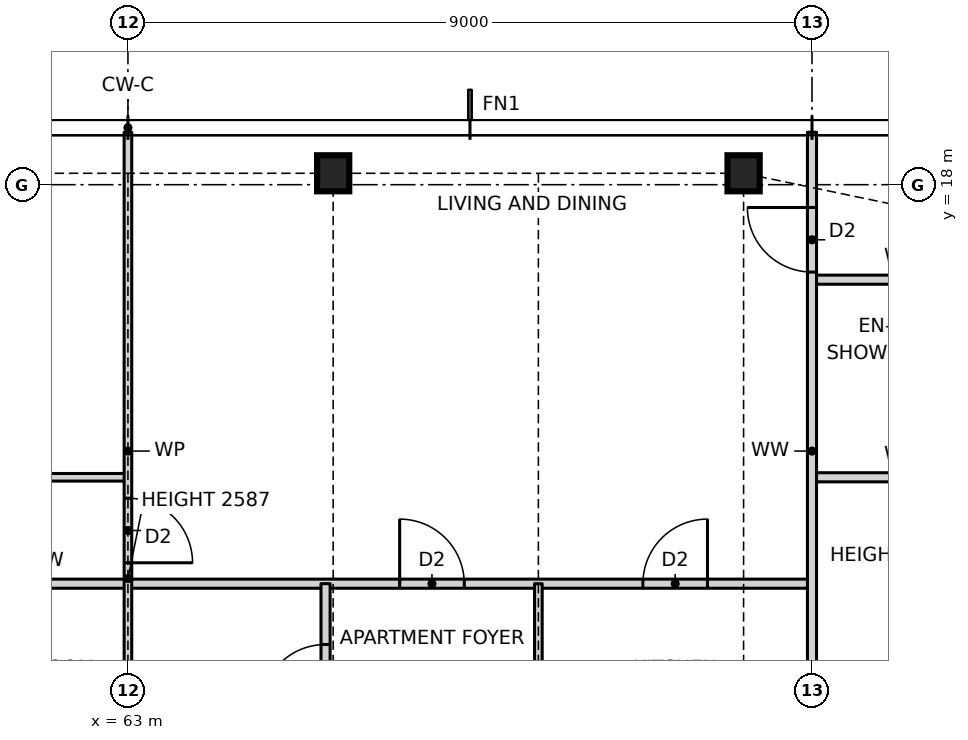
"""IFC4 building model, lengths in metres.
Left out: names, types, materials, properties, quantities, classifications, styles, units other than length and angle.
Written with IfcOpenShell. Run it as: python <this file> out.ifc"""

import sys

from ifc_helpers import new_model, si_unit, direction, frame, frame_2d, origin, origin_2d, place, context, subcontext, project, spatial, rectangle, i_section, extrude, element, fill, save


model = new_model("IFC4")
c1 = context("Model", 3, precision=1e-05, world=origin(), true_north=direction((0.0, 1.0)))
c2 = subcontext(c1, "Body", "Model", "MODEL_VIEW")
j1 = project(units=[si_unit("LENGTHUNIT", "METRE"), si_unit("PLANEANGLEUNIT", "RADIAN")], contexts=[c1])
p1 = place(None, origin())
s1 = spatial("IfcSite", under=j1, at=p1, CompositionType="ELEMENT")
p2 = place(p1, origin())
s2 = spatial("IfcBuilding", under=s1, at=p2, CompositionType="ELEMENT")
p3 = place(p2, frame((0.0, 0.0, 64.0)))
s3 = spatial("IfcBuildingStorey", under=s2, at=p3, CompositionType="ELEMENT", Elevation=64.0)
for number, where, z_axis, x_axis in (
    (1, (71.1, 18.15, 0.0), (0.0, 0.0, 1.0), (1.0, 0.0, 0.0)),
    (2, (65.7, 18.15, 0.0), (0.0, 0.0, 1.0), (1.0, 0.0, 0.0)),
):
    element("IfcColumn", number, at=place(p3, frame(where, z_axis=z_axis, x_axis=x_axis)), inside=s3, PredefinedType="COLUMN", context=c2, shape_type="SweptSolid", body=[
        extrude(i_section(OverallWidth=0.424, OverallDepth=0.475, WebThickness=0.048, FlangeThickness=0.077, at=origin_2d()), origin(), (0.0, 0.0, 1.0), 3.5),
    ])
p4 = place(p3, frame((51.8, 12.75, 0.0), z_axis=(0.0, 0.0, 1.0), x_axis=(1.0, 0.0, 0.0)))
e3 = element("IfcWall", 3, at=p4, inside=s3, PredefinedType="PARTITIONING", context=c2, shape_type="SweptSolid", body=[
    extrude(rectangle(XDim=20.2, YDim=0.12, at=frame_2d((10.1, 0.0))), origin(), (0.0, 0.0, 1.0), 3.27),
])
p5 = place(p4, frame((17.975, 0.0, 0.0)))
e4 = element("IfcOpeningElement", 4, at=p5, cuts=e3, PredefinedType="OPENING", context=c2, shape_type="SweptSolid", body=[
    extrude(rectangle(XDim=0.85, YDim=2.1, at=frame_2d((0.425, 1.05))), frame((0.0, 0.07, 0.0), z_axis=(0.0, -1.0, 0.0), x_axis=(1.0, 0.0, 0.0)), (0.0, 0.0, 1.0), 0.14),
])
p6 = place(p4, frame((14.775, 0.0, 0.0)))
e5 = element("IfcOpeningElement", 5, at=p6, cuts=e3, PredefinedType="OPENING", context=c2, shape_type="SweptSolid", body=[
    extrude(rectangle(XDim=0.85, YDim=2.1, at=frame_2d((0.425, 1.05))), frame((0.0, 0.07, 0.0), z_axis=(0.0, -1.0, 0.0), x_axis=(1.0, 0.0, 0.0)), (0.0, 0.0, 1.0), 0.14),
])
p7 = place(p4, frame((9.125, 0.0, 0.0)))
e6 = element("IfcOpeningElement", 6, at=p7, cuts=e3, PredefinedType="OPENING", context=c2, shape_type="SweptSolid", body=[
    extrude(rectangle(XDim=0.85, YDim=2.1, at=frame_2d((0.425, 1.05))), frame((0.0, 0.07, 0.0), z_axis=(0.0, -1.0, 0.0), x_axis=(1.0, 0.0, 0.0)), (0.0, 0.0, 1.0), 0.14),
])
p8 = place(p4, frame((3.525, 0.0, 0.0)))
e7 = element("IfcOpeningElement", 7, at=p8, cuts=e3, PredefinedType="OPENING", context=c2, shape_type="SweptSolid", body=[
    extrude(rectangle(XDim=0.85, YDim=2.1, at=frame_2d((0.425, 1.05))), frame((0.0, 0.07, 0.0), z_axis=(0.0, -1.0, 0.0), x_axis=(1.0, 0.0, 0.0)), (0.0, 0.0, 1.0), 0.14),
])
p9 = place(p3, frame((51.8, 14.15, 0.0), z_axis=(0.0, 0.0, 1.0), x_axis=(1.0, 0.0, 0.0)))
e8 = element("IfcWall", 8, at=p9, inside=s3, PredefinedType="PARTITIONING", context=c2, shape_type="SweptSolid", body=[
    extrude(rectangle(XDim=11.2, YDim=0.1, at=frame_2d((5.6, 0.0))), origin(), (0.0, 0.0, 1.0), 3.27),
])
p10 = place(p9, frame((8.525, 0.0, 0.0)))
e9 = element("IfcOpeningElement", 9, at=p10, cuts=e8, PredefinedType="OPENING", context=c2, shape_type="SweptSolid", body=[
    extrude(rectangle(XDim=0.85, YDim=2.1, at=frame_2d((0.425, 1.05))), frame((0.0, 0.06, 0.0), z_axis=(0.0, -1.0, 0.0), x_axis=(1.0, 0.0, 0.0)), (0.0, 0.0, 1.0), 0.12),
])
p11 = place(p9, frame((4.025, 0.0, 0.0)))
e10 = element("IfcOpeningElement", 10, at=p11, cuts=e8, PredefinedType="OPENING", context=c2, shape_type="SweptSolid", body=[
    extrude(rectangle(XDim=0.85, YDim=2.1, at=frame_2d((0.425, 1.05))), frame((0.0, 0.06, 0.0), z_axis=(0.0, -1.0, 0.0), x_axis=(1.0, 0.0, 0.0)), (0.0, 0.0, 1.0), 0.12),
])
p12 = place(p9, frame((0.675, 0.0, 0.0)))
e11 = element("IfcOpeningElement", 11, at=p12, cuts=e8, PredefinedType="OPENING", context=c2, shape_type="SweptSolid", body=[
    extrude(rectangle(XDim=0.85, YDim=2.1, at=frame_2d((0.425, 1.05))), frame((0.0, 0.06, 0.0), z_axis=(0.0, -1.0, 0.0), x_axis=(1.0, 0.0, 0.0)), (0.0, 0.0, 1.0), 0.12),
])
for number, where, z_axis, x_axis in (
    (12, (72.0, 14.15, 0.0), (0.0, 0.0, 1.0), (1.0, 0.0, 0.0)),
    (13, (72.0, 16.75, 0.0), (0.0, 0.0, 1.0), (1.0, 0.0, 0.0)),
):
    element("IfcWall", number, at=place(p3, frame(where, z_axis=z_axis, x_axis=x_axis)), inside=s3, PredefinedType="PARTITIONING", context=c2, shape_type="SweptSolid", body=[
        extrude(rectangle(XDim=2.4, YDim=0.12, at=frame_2d((1.2, 0.0))), origin(), (0.0, 0.0, 1.0), 3.27),
    ])
p13 = place(p3, frame((72.064, 10.3, 0.0), z_axis=(0.0, 0.0, 1.0), x_axis=(0.660700699661, 0.750649442461, 0.0)))
e14 = element("IfcWall", 14, at=p13, inside=s3, PredefinedType="PARTITIONING", context=c2, shape_type="SweptSolid", body=[
    extrude(rectangle(XDim=9.071, YDim=0.1, at=frame_2d((4.535, 0.0))), origin(), (0.0, 0.0, 1.0), 2.429),
])
p14 = place(p3, frame((72.0, 10.3, 0.0), z_axis=(0.0, 0.0, 1.0), x_axis=(0.0, 1.0, 0.0)))
e15 = element("IfcWall", 15, at=p14, inside=s3, PredefinedType="PARTITIONING", context=c2, shape_type="SweptSolid", body=[
    extrude(rectangle(XDim=8.39, YDim=0.12, at=frame_2d((4.195, 0.0))), origin(), (0.0, 0.0, 1.0), 3.27),
])
p15 = place(p14, frame((6.55, 0.0, 0.0)))
e16 = element("IfcOpeningElement", 16, at=p15, cuts=e15, PredefinedType="OPENING", context=c2, shape_type="SweptSolid", body=[
    extrude(rectangle(XDim=0.85, YDim=2.1, at=frame_2d((0.425, 1.05))), frame((0.0, 0.07, 0.0), z_axis=(0.0, -1.0, 0.0), x_axis=(1.0, 0.0, 0.0)), (0.0, 0.0, 1.0), 0.14),
])
p16 = place(p3, frame((68.4, 10.3, 0.0), z_axis=(0.0, 0.0, 1.0), x_axis=(0.0, 1.0, 0.0)))
e17 = element("IfcWall", 17, at=p16, inside=s3, PredefinedType="PARTITIONING", context=c2, shape_type="SweptSolid", body=[
    extrude(rectangle(XDim=2.45, YDim=0.1, at=frame_2d((1.225, 0.0))), origin(), (0.0, 0.0, 1.0), 2.587),
])
p17 = place(p3, frame((65.6, 10.3, 0.0), z_axis=(0.0, 0.0, 1.0), x_axis=(0.0, 1.0, 0.0)))
e18 = element("IfcWall", 18, at=p17, inside=s3, PredefinedType="PARTITIONING", context=c2, shape_type="SweptSolid", body=[
    extrude(rectangle(XDim=2.45, YDim=0.12, at=frame_2d((1.225, 0.0))), origin(), (0.0, 0.0, 1.0), 2.508),
])
p18 = place(p17, frame((0.8, 0.0, 0.0)))
e19 = element("IfcOpeningElement", 19, at=p18, cuts=e18, PredefinedType="OPENING", context=c2, shape_type="SweptSolid", body=[
    extrude(rectangle(XDim=0.85, YDim=2.1, at=frame_2d((0.425, 1.05))), frame((0.0, 0.07, 0.0), z_axis=(0.0, -1.0, 0.0), x_axis=(1.0, 0.0, 0.0)), (0.0, 0.0, 1.0), 0.14),
])
p19 = place(p3, frame((63.0, 10.3, 0.0), z_axis=(0.0, 0.0, 1.0), x_axis=(0.0, 1.0, 0.0)))
e20 = element("IfcWall", 20, at=p19, inside=s3, PredefinedType="PARTITIONING", context=c2, shape_type="SweptSolid", body=[
    extrude(rectangle(XDim=8.39, YDim=0.1, at=frame_2d((4.195, 0.0))), origin(), (0.0, 0.0, 1.0), 2.587),
])
p20 = place(p19, frame((2.725, 0.0, 0.0)))
e21 = element("IfcOpeningElement", 21, at=p20, cuts=e20, PredefinedType="OPENING", context=c2, shape_type="SweptSolid", body=[
    extrude(rectangle(XDim=0.85, YDim=2.1, at=frame_2d((0.425, 1.05))), frame((0.0, 0.06, 0.0), z_axis=(0.0, -1.0, 0.0), x_axis=(1.0, 0.0, 0.0)), (0.0, 0.0, 1.0), 0.12),
])
p21 = place(p5, origin())
e22 = element("IfcDoor", 22, at=p21, inside=s3, OperationType="SINGLE_SWING_RIGHT", PredefinedType="DOOR", context=c2, shape_type="SweptSolid", body=[
    extrude(rectangle(XDim=0.85, YDim=2.1, at=frame_2d((0.425, 1.05))), frame((0.0, 0.025, 0.0), z_axis=(0.0, -1.0, 0.0), x_axis=(1.0, 0.0, 0.0)), (0.0, 0.0, 1.0), 0.05),
])
fill(e4, e22)
p22 = place(p6, origin())
e23 = element("IfcDoor", 23, at=p22, inside=s3, OperationType="SINGLE_SWING_LEFT", PredefinedType="DOOR", context=c2, shape_type="SweptSolid", body=[
    extrude(rectangle(XDim=0.85, YDim=2.1, at=frame_2d((0.425, 1.05))), frame((0.0, 0.025, 0.0), z_axis=(0.0, -1.0, 0.0), x_axis=(1.0, 0.0, 0.0)), (0.0, 0.0, 1.0), 0.05),
])
fill(e5, e23)
p23 = place(p18, origin())
e24 = element("IfcDoor", 24, at=p23, inside=s3, OperationType="SINGLE_SWING_LEFT", PredefinedType="DOOR", context=c2, shape_type="SweptSolid", body=[
    extrude(rectangle(XDim=0.85, YDim=2.1, at=frame_2d((0.425, 1.05))), frame((0.0, 0.025, 0.0), z_axis=(0.0, -1.0, 0.0), x_axis=(1.0, 0.0, 0.0)), (0.0, 0.0, 1.0), 0.05),
])
fill(e19, e24)
p24 = place(p15, origin())
e25 = element("IfcDoor", 25, at=p24, inside=s3, OperationType="SINGLE_SWING_RIGHT", PredefinedType="DOOR", context=c2, shape_type="SweptSolid", body=[
    extrude(rectangle(XDim=0.85, YDim=2.1, at=frame_2d((0.425, 1.05))), frame((0.0, 0.025, 0.0), z_axis=(0.0, -1.0, 0.0), x_axis=(1.0, 0.0, 0.0)), (0.0, 0.0, 1.0), 0.05),
])
fill(e16, e25)
p25 = place(p20, frame((0.85, 0.0, 0.0), z_axis=(0.0, 0.0, 1.0), x_axis=(-1.0, 0.0, 0.0)))
e26 = element("IfcDoor", 26, at=p25, inside=s3, OperationType="SINGLE_SWING_RIGHT", PredefinedType="DOOR", context=c2, shape_type="SweptSolid", body=[
    extrude(rectangle(XDim=0.85, YDim=2.1, at=frame_2d((0.425, 1.05))), frame((0.0, 0.025, 0.0), z_axis=(0.0, -1.0, 0.0), x_axis=(1.0, 0.0, 0.0)), (0.0, 0.0, 1.0), 0.05),
])
fill(e21, e26)
save(model, sys.argv[1])
